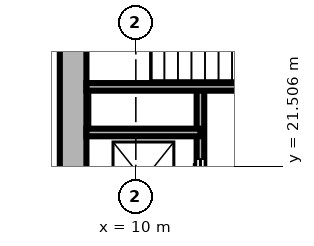
"""IFC4 building model, lengths in metres.
Left out: names, types, materials, properties, quantities, classifications, styles, units other than length and angle.
Written with IfcOpenShell. Run it as: python <this file> out.ifc"""

import sys

from ifc_helpers import new_model, si_unit, direction, frame, frame_2d, origin, place, context, subcontext, project, spatial, rectangle, extrude, element, fill, save


model = new_model("IFC4")
c1 = context("Model", 3, precision=1e-05, world=origin(), true_north=direction((0.0, 1.0)))
c2 = subcontext(c1, "Body", "Model", "MODEL_VIEW")
j1 = project(units=[si_unit("LENGTHUNIT", "METRE"), si_unit("PLANEANGLEUNIT", "RADIAN")], contexts=[c1])
p1 = place(None, origin())
s1 = spatial("IfcSite", under=j1, at=p1, CompositionType="ELEMENT")
p2 = place(p1, origin())
s2 = spatial("IfcBuilding", under=s1, at=p2, CompositionType="ELEMENT")
p3 = place(p2, frame((0.0, 0.0, 126.3)))
s3 = spatial("IfcBuildingStorey", under=s2, at=p3, CompositionType="ELEMENT", Elevation=126.3)
p4 = place(p3, frame((8.35, 27.3, 0.0), z_axis=(0.0, 0.0, 1.0), x_axis=(0.0, -1.0, 0.0)))
e1 = element("IfcWall", 1, at=p4, inside=s3, PredefinedType="SHEAR", context=c2, shape_type="SweptSolid", body=[
    extrude(rectangle(XDim=18.6, YDim=0.7, at=frame_2d((9.3, 0.0))), origin(), (0.0, 0.0, 1.0), 5.4),
])
p5 = place(p3, frame((8.7, 22.4, 0.0), z_axis=(0.0, 0.0, 1.0), x_axis=(1.0, 0.0, 0.0)))
e2 = element("IfcWall", 2, at=p5, inside=s3, PredefinedType="SHEAR", context=c2, shape_type="SweptSolid", body=[
    extrude(rectangle(XDim=3.0, YDim=0.2, at=frame_2d((1.5, 0.0))), origin(), (0.0, 0.0, 1.0), 5.08),
])
p6 = place(p3, frame((8.7, 23.6, 0.0), z_axis=(0.0, 0.0, 1.0), x_axis=(1.0, 0.0, 0.0)))
e3 = element("IfcWall", 3, at=p6, inside=s3, PredefinedType="SHEAR", context=c2, shape_type="SweptSolid", body=[
    extrude(rectangle(XDim=5.1, YDim=0.2, at=frame_2d((2.55, 0.0))), origin(), (0.0, 0.0, 1.0), 5.08),
])
p7 = place(p3, frame((11.7, 12.4, 0.0), z_axis=(0.0, 0.0, 1.0), x_axis=(0.0, 1.0, 0.0)))
e4 = element("IfcWall", 4, at=p7, inside=s3, PredefinedType="SHEAR", context=c2, shape_type="SweptSolid", body=[
    extrude(rectangle(XDim=11.2, YDim=0.2, at=frame_2d((5.6, 0.0))), origin(), (0.0, 0.0, 1.0), 5.08),
])
p8 = place(p7, frame((0.7, 0.0, 0.0)))
e5 = element("IfcOpeningElement", 5, at=p8, cuts=e4, PredefinedType="OPENING", context=c2, shape_type="SweptSolid", body=[
    extrude(rectangle(XDim=1.1, YDim=2.1, at=frame_2d((0.55, 1.05))), frame((0.0, 0.11, 0.0), z_axis=(0.0, -1.0, 0.0), x_axis=(1.0, 0.0, 0.0)), (0.0, 0.0, 1.0), 0.22),
])
p9 = place(p7, frame((3.2, 0.0, 0.0)))
e6 = element("IfcOpeningElement", 6, at=p9, cuts=e4, PredefinedType="OPENING", context=c2, shape_type="SweptSolid", body=[
    extrude(rectangle(XDim=1.1, YDim=2.1, at=frame_2d((0.55, 1.05))), frame((0.0, 0.11, 0.0), z_axis=(0.0, -1.0, 0.0), x_axis=(1.0, 0.0, 0.0)), (0.0, 0.0, 1.0), 0.22),
])
p10 = place(p7, frame((5.7, 0.0, 0.0)))
e7 = element("IfcOpeningElement", 7, at=p10, cuts=e4, PredefinedType="OPENING", context=c2, shape_type="SweptSolid", body=[
    extrude(rectangle(XDim=1.1, YDim=2.1, at=frame_2d((0.55, 1.05))), frame((0.0, 0.11, 0.0), z_axis=(0.0, -1.0, 0.0), x_axis=(1.0, 0.0, 0.0)), (0.0, 0.0, 1.0), 0.22),
])
p11 = place(p7, frame((8.2, 0.0, 0.0)))
e8 = element("IfcOpeningElement", 8, at=p11, cuts=e4, PredefinedType="OPENING", context=c2, shape_type="SweptSolid", body=[
    extrude(rectangle(XDim=1.1, YDim=2.1, at=frame_2d((0.55, 1.05))), frame((0.0, 0.11, 0.0), z_axis=(0.0, -1.0, 0.0), x_axis=(1.0, 0.0, 0.0)), (0.0, 0.0, 1.0), 0.22),
])
p12 = place(p11, origin())
e9 = element("IfcDoor", 9, at=p12, inside=s3, OperationType="DOUBLE_DOOR_SLIDING", PredefinedType="DOOR", context=c2, shape_type="SweptSolid", body=[
    extrude(rectangle(XDim=1.1, YDim=2.1, at=frame_2d((0.55, 1.05))), frame((0.0, 0.025, 0.0), z_axis=(0.0, -1.0, 0.0), x_axis=(1.0, 0.0, 0.0)), (0.0, 0.0, 1.0), 0.05),
])
fill(e8, e9)
save(model, sys.argv[1])
